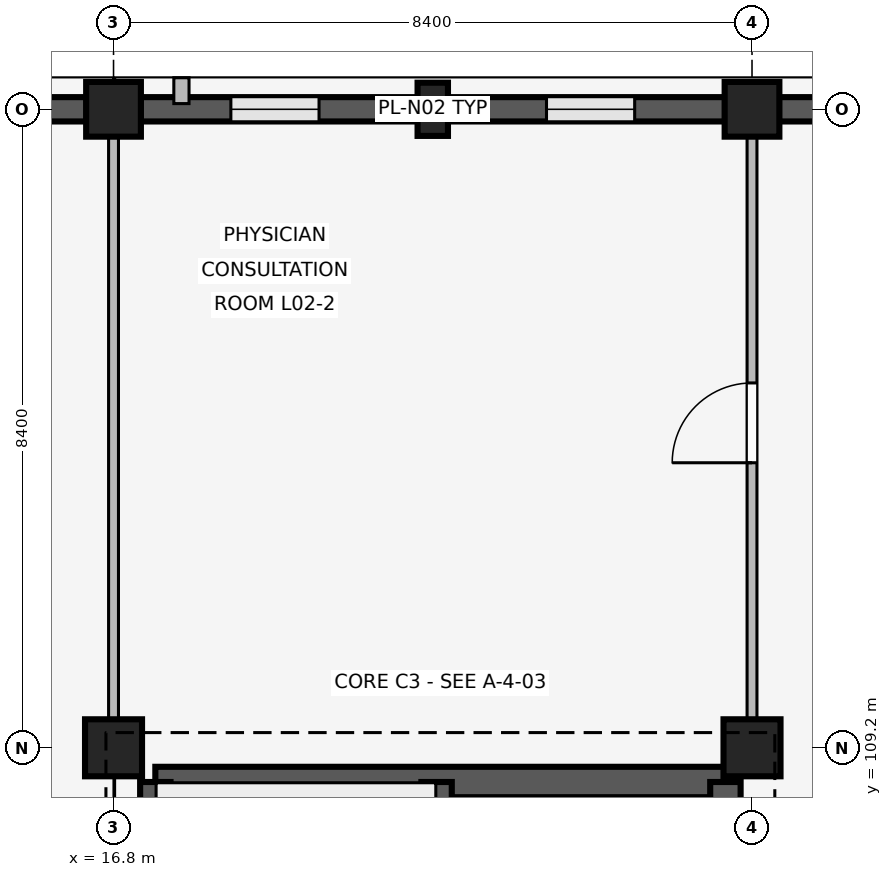
"""IFC4 building model, lengths in metres.
Left out: names, types, materials, properties, quantities, classifications, styles, units other than length and angle.
Written with IfcOpenShell. Run it as: python <this file> out.ifc"""

import sys

from ifc_helpers import new_model, si_unit, direction, frame, frame_2d, origin, origin_2d, place, context, subcontext, project, spatial, rectangle, extrude, element, fill, save


model = new_model("IFC4")
c1 = context("Model", 3, precision=1e-05, world=origin(), true_north=direction((0.0, 1.0)))
c2 = subcontext(c1, "Body", "Model", "MODEL_VIEW")
j1 = project(units=[si_unit("LENGTHUNIT", "METRE"), si_unit("PLANEANGLEUNIT", "RADIAN")], contexts=[c1])
p1 = place(None, origin())
s1 = spatial("IfcSite", under=j1, at=p1, CompositionType="ELEMENT")
p2 = place(p1, origin())
s2 = spatial("IfcBuilding", under=s1, at=p2, CompositionType="ELEMENT")
p3 = place(p2, frame((0.0, 0.0, 8.1)))
s3 = spatial("IfcBuildingStorey", under=s2, at=p3, CompositionType="ELEMENT", Elevation=8.1)
p4 = place(p3, frame((16.8, 109.2, 0.0), z_axis=(0.0, 0.0, 1.0), x_axis=(1.0, 0.0, 0.0)))
e1 = element("IfcColumn", 1, at=p4, inside=s3, PredefinedType="COLUMN", context=c2, shape_type="SweptSolid", body=[
    extrude(rectangle(XDim=0.75, YDim=0.75, at=origin_2d()), origin(), (0.0, 0.0, 1.0), 4.8),
])
p5 = place(p3, frame((16.8, 117.6, 0.0), z_axis=(0.0, 0.0, 1.0), x_axis=(1.0, 0.0, 0.0)))
e2 = element("IfcColumn", 2, at=p5, inside=s3, PredefinedType="COLUMN", context=c2, shape_type="SweptSolid", body=[
    extrude(rectangle(XDim=0.72, YDim=0.72, at=origin_2d()), origin(), (0.0, 0.0, 1.0), 4.8),
])
p6 = place(p3, frame((25.2, 109.2, 0.0), z_axis=(0.0, 0.0, 1.0), x_axis=(1.0, 0.0, 0.0)))
e3 = element("IfcColumn", 3, at=p6, inside=s3, PredefinedType="COLUMN", context=c2, shape_type="SweptSolid", body=[
    extrude(rectangle(XDim=0.75, YDim=0.75, at=origin_2d()), origin(), (0.0, 0.0, 1.0), 4.8),
])
p7 = place(p3, frame((25.2, 117.6, 0.0), z_axis=(0.0, 0.0, 1.0), x_axis=(1.0, 0.0, 0.0)))
e4 = element("IfcColumn", 4, at=p7, inside=s3, PredefinedType="COLUMN", context=c2, shape_type="SweptSolid", body=[
    extrude(rectangle(XDim=0.72, YDim=0.72, at=origin_2d()), origin(), (0.0, 0.0, 1.0), 4.8),
])
p8 = place(p3, frame((21.0, 117.6, 0.0), z_axis=(0.0, 0.0, 1.0), x_axis=(1.0, 0.0, 0.0)))
e5 = element("IfcColumn", 5, at=p8, inside=s3, PredefinedType="PILASTER", context=c2, shape_type="SweptSolid", body=[
    extrude(rectangle(XDim=0.4, YDim=0.7, at=origin_2d()), origin(), (0.0, 0.0, 1.0), 4.8),
])
p9 = place(p3, frame((8.755, 117.6, 0.0), z_axis=(0.0, 0.0, 1.0), x_axis=(1.0, 0.0, 0.0)))
e6 = element("IfcWall", 6, at=p9, inside=s3, PredefinedType="SOLIDWALL", context=c2, shape_type="SweptSolid", body=[
    extrude(rectangle(XDim=7.69, YDim=0.32, at=frame_2d((3.845, 0.0))), origin(), (0.0, 0.0, 1.0), 3.86),
])
p10 = place(p9, frame((1.139, 0.0, 0.85)))
e7 = element("IfcOpeningElement", 7, at=p10, cuts=e6, PredefinedType="OPENING", context=c2, shape_type="SweptSolid", body=[
    extrude(rectangle(XDim=1.26, YDim=1.52, at=frame_2d((0.63, 0.76))), frame((0.0, 0.17, 0.0), z_axis=(0.0, -1.0, 0.0), x_axis=(1.0, 0.0, 0.0)), (0.0, 0.0, 1.0), 0.34),
])
p11 = place(p9, frame((5.291, 0.0, 0.85)))
e8 = element("IfcOpeningElement", 8, at=p11, cuts=e6, PredefinedType="OPENING", context=c2, shape_type="SweptSolid", body=[
    extrude(rectangle(XDim=1.26, YDim=1.52, at=frame_2d((0.63, 0.76))), frame((0.0, 0.17, 0.0), z_axis=(0.0, -1.0, 0.0), x_axis=(1.0, 0.0, 0.0)), (0.0, 0.0, 1.0), 0.34),
])
p12 = place(p3, frame((17.155, 117.6, 0.0), z_axis=(0.0, 0.0, 1.0), x_axis=(1.0, 0.0, 0.0)))
e9 = element("IfcWall", 9, at=p12, inside=s3, PredefinedType="SOLIDWALL", context=c2, shape_type="SweptSolid", body=[
    extrude(rectangle(XDim=7.69, YDim=0.32, at=frame_2d((3.845, 0.0))), origin(), (0.0, 0.0, 1.0), 3.86),
])
p13 = place(p12, frame((1.189, 0.0, 0.85)))
e10 = element("IfcOpeningElement", 10, at=p13, cuts=e9, PredefinedType="OPENING", context=c2, shape_type="SweptSolid", body=[
    extrude(rectangle(XDim=1.16, YDim=1.48, at=frame_2d((0.58, 0.74))), frame((0.0, 0.17, 0.0), z_axis=(0.0, -1.0, 0.0), x_axis=(1.0, 0.0, 0.0)), (0.0, 0.0, 1.0), 0.34),
])
p14 = place(p12, frame((5.341, 0.0, 0.85)))
e11 = element("IfcOpeningElement", 11, at=p14, cuts=e9, PredefinedType="OPENING", context=c2, shape_type="SweptSolid", body=[
    extrude(rectangle(XDim=1.16, YDim=1.48, at=frame_2d((0.58, 0.74))), frame((0.0, 0.17, 0.0), z_axis=(0.0, -1.0, 0.0), x_axis=(1.0, 0.0, 0.0)), (0.0, 0.0, 1.0), 0.34),
])
p15 = place(p3, frame((17.693, 117.675, 0.0), z_axis=(0.0, 0.0, 1.0), x_axis=(0.0, 1.0, 0.0)))
e12 = element("IfcWall", 12, at=p15, inside=s3, PredefinedType="ELEMENTEDWALL", context=c2, shape_type="SweptSolid", body=[
    extrude(rectangle(XDim=0.34, YDim=0.2, at=frame_2d((0.17, 0.0))), origin(), (0.0, 0.0, 1.0), 3.84),
])
p16 = place(p3, frame((25.555, 117.6, 0.0), z_axis=(0.0, 0.0, 1.0), x_axis=(1.0, 0.0, 0.0)))
e13 = element("IfcWall", 13, at=p16, inside=s3, PredefinedType="SOLIDWALL", context=c2, shape_type="SweptSolid", body=[
    extrude(rectangle(XDim=7.69, YDim=0.32, at=frame_2d((3.845, 0.0))), origin(), (0.0, 0.0, 1.0), 3.86),
])
p17 = place(p16, frame((1.069, 0.0, 0.85)))
e14 = element("IfcOpeningElement", 14, at=p17, cuts=e13, PredefinedType="OPENING", context=c2, shape_type="SweptSolid", body=[
    extrude(rectangle(XDim=1.4, YDim=1.4, at=frame_2d((0.7, 0.7))), frame((0.0, 0.17, 0.0), z_axis=(0.0, -1.0, 0.0), x_axis=(1.0, 0.0, 0.0)), (0.0, 0.0, 1.0), 0.34),
])
p18 = place(p16, frame((5.221, 0.0, 0.85)))
e15 = element("IfcOpeningElement", 15, at=p18, cuts=e13, PredefinedType="OPENING", context=c2, shape_type="SweptSolid", body=[
    extrude(rectangle(XDim=1.4, YDim=1.4, at=frame_2d((0.7, 0.7))), frame((0.0, 0.17, 0.0), z_axis=(0.0, -1.0, 0.0), x_axis=(1.0, 0.0, 0.0)), (0.0, 0.0, 1.0), 0.34),
])
p19 = place(p3, frame((17.35, 108.75, 0.0), z_axis=(0.0, 0.0, 1.0), x_axis=(1.0, 0.0, 0.0)))
e16 = element("IfcWall", 16, at=p19, inside=s3, PredefinedType="SHEAR", context=c2, shape_type="SweptSolid", body=[
    extrude(rectangle(XDim=7.5, YDim=0.4, at=frame_2d((3.75, 0.0))), origin(), (0.0, 0.0, 1.0), 4.52),
])
p20 = place(p3, frame((17.35, 101.2, 0.0), z_axis=(0.0, 0.0, 1.0), x_axis=(0.0, 1.0, 0.0)))
e17 = element("IfcWall", 17, at=p20, inside=s3, PredefinedType="SHEAR", context=c2, shape_type="SweptSolid", body=[
    extrude(rectangle(XDim=7.55, YDim=0.4, at=frame_2d((3.775, 0.0))), origin(), (0.0, 0.0, 1.0), 4.52),
])
p21 = place(p20, frame((0.28, 0.0, 0.0)))
e18 = element("IfcOpeningElement", 18, at=p21, cuts=e17, PredefinedType="OPENING", context=c2, shape_type="SweptSolid", body=[
    extrude(rectangle(XDim=1.0, YDim=2.15, at=frame_2d((0.5, 1.075))), frame((0.0, 0.21, 0.0), z_axis=(0.0, -1.0, 0.0), x_axis=(1.0, 0.0, 0.0)), (0.0, 0.0, 1.0), 0.42),
])
p22 = place(p3, frame((24.85, 101.2, 0.0), z_axis=(0.0, 0.0, 1.0), x_axis=(0.0, 1.0, 0.0)))
e19 = element("IfcWall", 19, at=p22, inside=s3, PredefinedType="SHEAR", context=c2, shape_type="SweptSolid", body=[
    extrude(rectangle(XDim=7.55, YDim=0.4, at=frame_2d((3.775, 0.0))), origin(), (0.0, 0.0, 1.0), 4.52),
])
p23 = place(p22, frame((2.4, 0.0, 0.0)))
e20 = element("IfcOpeningElement", 20, at=p23, cuts=e19, PredefinedType="OPENING", context=c2, shape_type="SweptSolid", body=[
    extrude(rectangle(XDim=1.2, YDim=2.2, at=frame_2d((0.6, 1.1))), frame((0.0, 0.21, 0.0), z_axis=(0.0, -1.0, 0.0), x_axis=(1.0, 0.0, 0.0)), (0.0, 0.0, 1.0), 0.42),
])
p24 = place(p3, frame((21.05, 101.2, 0.0), z_axis=(0.0, 0.0, 1.0), x_axis=(0.0, 1.0, 0.0)))
e21 = element("IfcWall", 21, at=p24, inside=s3, PredefinedType="SHEAR", context=c2, shape_type="SweptSolid", body=[
    extrude(rectangle(XDim=7.55, YDim=0.4, at=frame_2d((3.775, 0.0))), origin(), (0.0, 0.0, 1.0), 4.52),
])
p25 = place(p24, frame((0.28, 0.0, 0.0)))
e22 = element("IfcOpeningElement", 22, at=p25, cuts=e21, PredefinedType="OPENING", context=c2, shape_type="SweptSolid", body=[
    extrude(rectangle(XDim=1.0, YDim=2.15, at=frame_2d((0.5, 1.075))), frame((0.0, 0.21, 0.0), z_axis=(0.0, -1.0, 0.0), x_axis=(1.0, 0.0, 0.0)), (0.0, 0.0, 1.0), 0.42),
])
p26 = place(p3, frame((16.8, 109.55, 0.0), z_axis=(0.0, 0.0, 1.0), x_axis=(0.0, 1.0, 0.0)))
e23 = element("IfcWall", 23, at=p26, inside=s3, PredefinedType="PARTITIONING", context=c2, shape_type="SweptSolid", body=[
    extrude(rectangle(XDim=7.91, YDim=0.13, at=frame_2d((3.955, 0.0))), origin(), (0.0, 0.0, 1.0), 3.84),
])
p27 = place(p3, frame((25.2, 109.55, 0.0), z_axis=(0.0, 0.0, 1.0), x_axis=(0.0, 1.0, 0.0)))
e24 = element("IfcWall", 24, at=p27, inside=s3, PredefinedType="PARTITIONING", context=c2, shape_type="SweptSolid", body=[
    extrude(rectangle(XDim=7.91, YDim=0.13, at=frame_2d((3.955, 0.0))), origin(), (0.0, 0.0, 1.0), 3.84),
])
p28 = place(p27, frame((3.4, 0.0, 0.0)))
e25 = element("IfcOpeningElement", 25, at=p28, cuts=e24, PredefinedType="OPENING", context=c2, shape_type="SweptSolid", body=[
    extrude(rectangle(XDim=1.05, YDim=2.2, at=frame_2d((0.525, 1.1))), frame((0.0, 0.075, 0.0), z_axis=(0.0, -1.0, 0.0), x_axis=(1.0, 0.0, 0.0)), (0.0, 0.0, 1.0), 0.15),
])
p29 = place(p13, origin())
e26 = element("IfcWindow", 26, at=p29, inside=s3, PartitioningType="SINGLE_PANEL", PredefinedType="WINDOW", context=c2, shape_type="SweptSolid", body=[
    extrude(rectangle(XDim=1.16, YDim=1.48, at=frame_2d((0.58, 0.74))), frame((0.0, 0.03, 0.0), z_axis=(0.0, -1.0, 0.0), x_axis=(1.0, 0.0, 0.0)), (0.0, 0.0, 1.0), 0.06),
])
fill(e10, e26)
p30 = place(p14, origin())
e27 = element("IfcWindow", 27, at=p30, inside=s3, PartitioningType="SINGLE_PANEL", PredefinedType="WINDOW", context=c2, shape_type="SweptSolid", body=[
    extrude(rectangle(XDim=1.16, YDim=1.48, at=frame_2d((0.58, 0.74))), frame((0.0, 0.03, 0.0), z_axis=(0.0, -1.0, 0.0), x_axis=(1.0, 0.0, 0.0)), (0.0, 0.0, 1.0), 0.06),
])
fill(e11, e27)
p31 = place(p28, origin())
e28 = element("IfcDoor", 28, at=p31, inside=s3, OperationType="SINGLE_SWING_LEFT", PredefinedType="DOOR", context=c2, shape_type="SweptSolid", body=[
    extrude(rectangle(XDim=1.05, YDim=2.2, at=frame_2d((0.525, 1.1))), frame((0.0, 0.025, 0.0), z_axis=(0.0, -1.0, 0.0), x_axis=(1.0, 0.0, 0.0)), (0.0, 0.0, 1.0), 0.05),
])
fill(e25, e28)
save(model, sys.argv[1])
